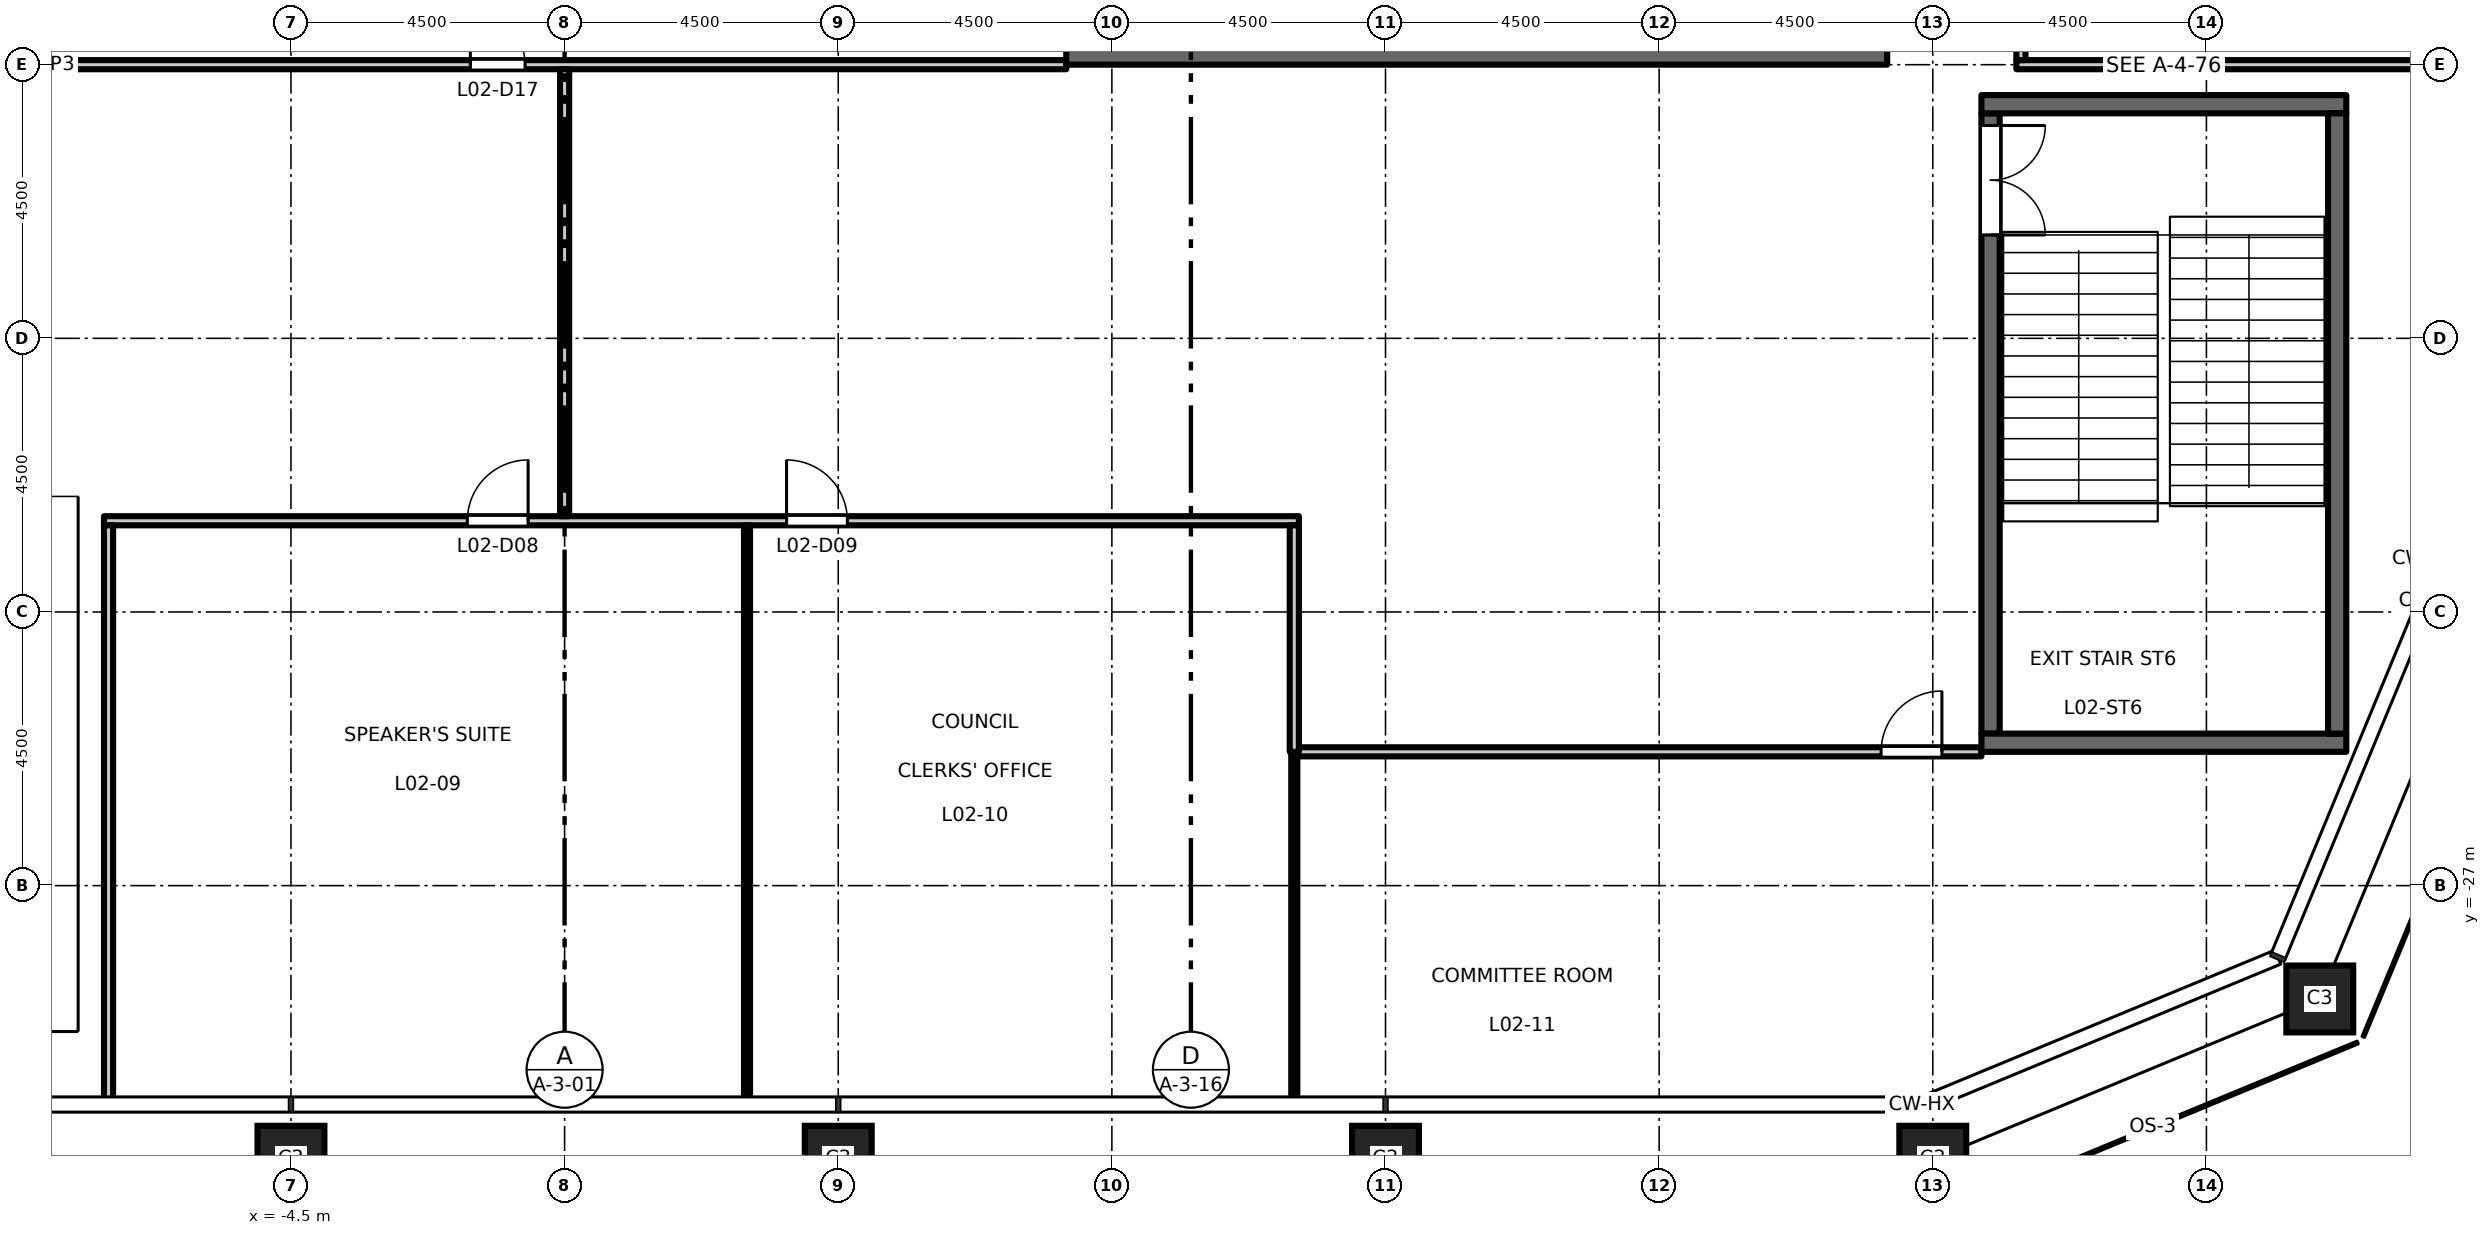
"""IFC4 building model, lengths in metres.
Left out: names, types, materials, properties, quantities, classifications, styles, units other than length and angle.
Written with IfcOpenShell. Run it as: python <this file> out.ifc"""

import sys

from ifc_helpers import new_model, si_unit, direction, frame, frame_2d, origin, origin_2d, place, context, subcontext, project, spatial, rectangle, hollow_rectangle, extrude, element, fill, save


model = new_model("IFC4")
c1 = context("Model", 3, precision=1e-05, world=origin(), true_north=direction((0.0, 1.0)))
c2 = subcontext(c1, "Body", "Model", "MODEL_VIEW")
j1 = project(units=[si_unit("LENGTHUNIT", "METRE"), si_unit("PLANEANGLEUNIT", "RADIAN")], contexts=[c1])
p1 = place(None, origin())
s1 = spatial("IfcSite", under=j1, at=p1, CompositionType="ELEMENT")
p2 = place(p1, origin())
s2 = spatial("IfcBuilding", under=s1, at=p2, CompositionType="ELEMENT")
p3 = place(p2, frame((0.0, 0.0, 12.2)))
s3 = spatial("IfcBuildingStorey", under=s2, at=p3, CompositionType="ELEMENT", Elevation=12.2)
for number, where, z_axis, x_axis in (
    (1, (-4.5, -31.5, 0.0), (0.0, 0.0, 1.0), (1.0, 0.0, 0.0)),
    (2, (4.5, -31.5, 0.0), (0.0, 0.0, 1.0), (1.0, 0.0, 0.0)),
    (3, (13.5, -31.5, 0.0), (0.0, 0.0, 1.0), (1.0, 0.0, 0.0)),
    (4, (22.5, -31.5, 0.0), (0.0, 0.0, 1.0), (1.0, 0.0, 0.0)),
    (5, (28.864, -28.864, 0.0), (0.0, 0.0, 1.0), (1.0, 0.0, 0.0)),
):
    element("IfcColumn", number, at=place(p3, frame(where, z_axis=z_axis, x_axis=x_axis)), inside=s3, PredefinedType="COLUMN", context=c2, shape_type="SweptSolid", body=[
        extrude(hollow_rectangle(XDim=1.1, YDim=1.1, WallThickness=0.07, at=origin_2d()), origin(), (0.0, 0.0, 1.0), 5.0),
    ])
for number, where, z_axis, x_axis in (
    (6, (-8.25, -13.25, 0.0), (0.0, 0.0, 1.0), (-1.0, 0.0, 0.0)),
    (7, (8.25, -13.25, 0.0), (0.0, 0.0, 1.0), (1.0, 0.0, 0.0)),
):
    element("IfcWall", number, at=place(p3, frame(where, z_axis=z_axis, x_axis=x_axis)), inside=s3, PredefinedType="SHEAR", context=c2, shape_type="SweptSolid", body=[
        extrude(rectangle(XDim=13.5, YDim=0.5, at=frame_2d((6.75, 0.0))), origin(), (0.0, 0.0, 1.0), 4.85),
    ])
p4 = place(p3, frame((23.45, -14.3, 0.0), z_axis=(0.0, 0.0, 1.0), x_axis=(0.0, -1.0, 0.0)))
e8 = element("IfcWall", 8, at=p4, inside=s3, PredefinedType="SHEAR", context=c2, shape_type="SweptSolid", body=[
    extrude(rectangle(XDim=10.2, YDim=0.3, at=frame_2d((5.1, 0.0))), origin(), (0.0, 0.0, 1.0), 4.85),
])
p5 = place(p4, frame((0.2, 0.0, 0.0)))
e9 = element("IfcOpeningElement", 9, at=p5, cuts=e8, PredefinedType="OPENING", context=c2, shape_type="SweptSolid", body=[
    extrude(rectangle(XDim=1.8, YDim=2.1, at=frame_2d((0.9, 1.05))), frame((0.0, 0.16, 0.0), z_axis=(0.0, -1.0, 0.0), x_axis=(1.0, 0.0, 0.0)), (0.0, 0.0, 1.0), 0.32),
])
for number, where, z_axis, x_axis in (
    (10, (29.3, -24.65, 0.0), (0.0, 0.0, 1.0), (-1.0, 0.0, 0.0)),
    (11, (29.3, -14.15, 0.0), (0.0, 0.0, 1.0), (-1.0, 0.0, 0.0)),
):
    element("IfcWall", number, at=place(p3, frame(where, z_axis=z_axis, x_axis=x_axis)), inside=s3, PredefinedType="SHEAR", context=c2, shape_type="SweptSolid", body=[
        extrude(rectangle(XDim=6.0, YDim=0.3, at=frame_2d((3.0, 0.0))), origin(), (0.0, 0.0, 1.0), 4.85),
    ])
p6 = place(p3, frame((29.15, -14.3, 0.0), z_axis=(0.0, 0.0, 1.0), x_axis=(0.0, -1.0, 0.0)))
e12 = element("IfcWall", 12, at=p6, inside=s3, PredefinedType="SHEAR", context=c2, shape_type="SweptSolid", body=[
    extrude(rectangle(XDim=10.2, YDim=0.3, at=frame_2d((5.1, 0.0))), origin(), (0.0, 0.0, 1.0), 4.85),
])
p7 = place(p3, frame((12.05, -24.8, 0.0), z_axis=(0.0, 0.0, 1.0), x_axis=(1.0, 0.0, 0.0)))
e13 = element("IfcWall", 13, at=p7, inside=s3, PredefinedType="PARTITIONING", context=c2, shape_type="SweptSolid", body=[
    extrude(rectangle(XDim=11.25, YDim=0.15, at=frame_2d((5.625, 0.0))), origin(), (0.0, 0.0, 1.0), 4.85),
])
p8 = place(p7, frame((9.6, 0.0, 0.0)))
e14 = element("IfcOpeningElement", 14, at=p8, cuts=e13, PredefinedType="OPENING", context=c2, shape_type="SweptSolid", body=[
    extrude(rectangle(XDim=1.0, YDim=2.1, at=frame_2d((0.5, 1.05))), frame((0.0, 0.085, 0.0), z_axis=(0.0, -1.0, 0.0), x_axis=(1.0, 0.0, 0.0)), (0.0, 0.0, 1.0), 0.17),
])
p9 = place(p3, frame((-7.575, -21.0, 0.0), z_axis=(0.0, 0.0, 1.0), x_axis=(1.0, 0.0, 0.0)))
e15 = element("IfcWall", 15, at=p9, inside=s3, PredefinedType="PARTITIONING", context=c2, shape_type="SweptSolid", body=[
    extrude(rectangle(XDim=19.65, YDim=0.15, at=frame_2d((9.825, 0.0))), origin(), (0.0, 0.0, 1.0), 4.85),
])
p10 = place(p9, frame((5.975, 0.0, 0.0)))
e16 = element("IfcOpeningElement", 16, at=p10, cuts=e15, PredefinedType="OPENING", context=c2, shape_type="SweptSolid", body=[
    extrude(rectangle(XDim=1.0, YDim=2.1, at=frame_2d((0.5, 1.05))), frame((0.0, 0.085, 0.0), z_axis=(0.0, -1.0, 0.0), x_axis=(1.0, 0.0, 0.0)), (0.0, 0.0, 1.0), 0.17),
])
p11 = place(p9, frame((11.225, 0.0, 0.0)))
e17 = element("IfcOpeningElement", 17, at=p11, cuts=e15, PredefinedType="OPENING", context=c2, shape_type="SweptSolid", body=[
    extrude(rectangle(XDim=1.0, YDim=2.1, at=frame_2d((0.5, 1.05))), frame((0.0, 0.085, 0.0), z_axis=(0.0, -1.0, 0.0), x_axis=(1.0, 0.0, 0.0)), (0.0, 0.0, 1.0), 0.17),
])
p12 = place(p3, frame((23.875, -13.5, 0.0), z_axis=(0.0, 0.0, 1.0), x_axis=(1.0, 0.0, 0.0)))
e18 = element("IfcWall", 18, at=p12, inside=s3, PredefinedType="PARTITIONING", context=c2, shape_type="SweptSolid", body=[
    extrude(rectangle(XDim=6.635, YDim=0.15, at=frame_2d((3.317, 0.0))), origin(), (0.0, 0.0, 1.0), 3.85),
])
p13 = place(p3, frame((-8.25, -13.5, 0.0), z_axis=(0.0, 0.0, 1.0), x_axis=(1.0, 0.0, 0.0)))
e19 = element("IfcWall", 19, at=p13, inside=s3, PredefinedType="PARTITIONING", context=c2, shape_type="SweptSolid", body=[
    extrude(rectangle(XDim=16.5, YDim=0.15, at=frame_2d((8.25, 0.0))), origin(), (0.0, 0.0, 1.0), 4.35),
])
p14 = place(p13, frame((6.7, 0.0, 0.0)))
e20 = element("IfcOpeningElement", 20, at=p14, cuts=e19, PredefinedType="OPENING", context=c2, shape_type="SweptSolid", body=[
    extrude(rectangle(XDim=0.9, YDim=2.1, at=frame_2d((0.45, 1.05))), frame((0.0, 0.085, 0.0), z_axis=(0.0, -1.0, 0.0), x_axis=(1.0, 0.0, 0.0)), (0.0, 0.0, 1.0), 0.17),
])
p15 = place(p3, frame((-7.5, -30.51, 0.0), z_axis=(0.0, 0.0, 1.0), x_axis=(0.0, 1.0, 0.0)))
e21 = element("IfcWall", 21, at=p15, inside=s3, PredefinedType="PARTITIONING", context=c2, shape_type="SweptSolid", body=[
    extrude(rectangle(XDim=9.435, YDim=0.15, at=frame_2d((4.718, 0.0))), origin(), (0.0, 0.0, 1.0), 4.85),
])
p16 = place(p3, frame((0.0, -20.925, 0.0), z_axis=(0.0, 0.0, 1.0), x_axis=(0.0, 1.0, 0.0)))
e22 = element("IfcWall", 22, at=p16, inside=s3, PredefinedType="PARTITIONING", context=c2, shape_type="SweptSolid", body=[
    extrude(rectangle(XDim=7.35, YDim=0.15, at=frame_2d((3.675, 0.0))), origin(), (0.0, 0.0, 1.0), 4.85),
])
p17 = place(p3, frame((3.0, -30.51, 0.0), z_axis=(0.0, 0.0, 1.0), x_axis=(0.0, 1.0, 0.0)))
e23 = element("IfcWall", 23, at=p17, inside=s3, PredefinedType="PARTITIONING", context=c2, shape_type="SweptSolid", body=[
    extrude(rectangle(XDim=9.435, YDim=0.1, at=frame_2d((4.718, 0.0))), origin(), (0.0, 0.0, 1.0), 4.85),
])
p18 = place(p3, frame((12.0, -30.51, 0.0), z_axis=(0.0, 0.0, 1.0), x_axis=(0.0, 1.0, 0.0)))
e24 = element("IfcWall", 24, at=p18, inside=s3, PredefinedType="PARTITIONING", context=c2, shape_type="SweptSolid", body=[
    extrude(rectangle(XDim=5.71, YDim=0.1, at=frame_2d((2.855, 0.0))), origin(), (0.0, 0.0, 1.0), 4.85),
])
p19 = place(p3, frame((12.0, -24.8, 0.0), z_axis=(0.0, 0.0, 1.0), x_axis=(0.0, 1.0, 0.0)))
e25 = element("IfcWall", 25, at=p19, inside=s3, PredefinedType="PARTITIONING", context=c2, shape_type="SweptSolid", body=[
    extrude(rectangle(XDim=3.725, YDim=0.15, at=frame_2d((1.863, 0.0))), origin(), (0.0, 0.0, 1.0), 4.85),
])
p20 = place(p3, frame((23.95, -13.425, 0.0), z_axis=(0.0, 0.0, 1.0), x_axis=(0.0, 1.0, 0.0)))
e26 = element("IfcWall", 26, at=p20, inside=s3, PredefinedType="PARTITIONING", context=c2, shape_type="SweptSolid", body=[
    extrude(rectangle(XDim=10.35, YDim=0.15, at=frame_2d((5.175, 0.0))), origin(), (0.0, 0.0, 1.0), 4.85),
])
p21 = place(p20, frame((8.825, 0.0, 0.0)))
e27 = element("IfcOpeningElement", 27, at=p21, cuts=e26, PredefinedType="OPENING", context=c2, shape_type="SweptSolid", body=[
    extrude(rectangle(XDim=1.0, YDim=2.1, at=frame_2d((0.5, 1.05))), frame((0.0, 0.085, 0.0), z_axis=(0.0, -1.0, 0.0), x_axis=(1.0, 0.0, 0.0)), (0.0, 0.0, 1.0), 0.17),
])
p22 = place(p5, origin())
e28 = element("IfcDoor", 28, at=p22, inside=s3, OperationType="DOUBLE_DOOR_SINGLE_SWING", PredefinedType="DOOR", context=c2, shape_type="SweptSolid", body=[
    extrude(rectangle(XDim=1.8, YDim=2.1, at=frame_2d((0.9, 1.05))), frame((0.0, 0.025, 0.0), z_axis=(0.0, -1.0, 0.0), x_axis=(1.0, 0.0, 0.0)), (0.0, 0.0, 1.0), 0.05),
])
fill(e9, e28)
p23 = place(p10, origin())
e29 = element("IfcDoor", 29, at=p23, inside=s3, OperationType="SINGLE_SWING_RIGHT", PredefinedType="DOOR", context=c2, shape_type="SweptSolid", body=[
    extrude(rectangle(XDim=1.0, YDim=2.1, at=frame_2d((0.5, 1.05))), frame((0.0, 0.025, 0.0), z_axis=(0.0, -1.0, 0.0), x_axis=(1.0, 0.0, 0.0)), (0.0, 0.0, 1.0), 0.05),
])
fill(e16, e29)
p24 = place(p11, origin())
e30 = element("IfcDoor", 30, at=p24, inside=s3, OperationType="SINGLE_SWING_LEFT", PredefinedType="DOOR", context=c2, shape_type="SweptSolid", body=[
    extrude(rectangle(XDim=1.0, YDim=2.1, at=frame_2d((0.5, 1.05))), frame((0.0, 0.025, 0.0), z_axis=(0.0, -1.0, 0.0), x_axis=(1.0, 0.0, 0.0)), (0.0, 0.0, 1.0), 0.05),
])
fill(e17, e30)
p25 = place(p8, origin())
e31 = element("IfcDoor", 31, at=p25, inside=s3, OperationType="SINGLE_SWING_RIGHT", PredefinedType="DOOR", context=c2, shape_type="SweptSolid", body=[
    extrude(rectangle(XDim=1.0, YDim=2.1, at=frame_2d((0.5, 1.05))), frame((0.0, 0.025, 0.0), z_axis=(0.0, -1.0, 0.0), x_axis=(1.0, 0.0, 0.0)), (0.0, 0.0, 1.0), 0.05),
])
fill(e14, e31)
p26 = place(p14, origin())
e32 = element("IfcDoor", 32, at=p26, inside=s3, OperationType="SINGLE_SWING_LEFT", PredefinedType="DOOR", context=c2, shape_type="SweptSolid", body=[
    extrude(rectangle(XDim=0.9, YDim=2.1, at=frame_2d((0.45, 1.05))), frame((0.0, 0.025, 0.0), z_axis=(0.0, -1.0, 0.0), x_axis=(1.0, 0.0, 0.0)), (0.0, 0.0, 1.0), 0.05),
])
fill(e20, e32)
save(model, sys.argv[1])
